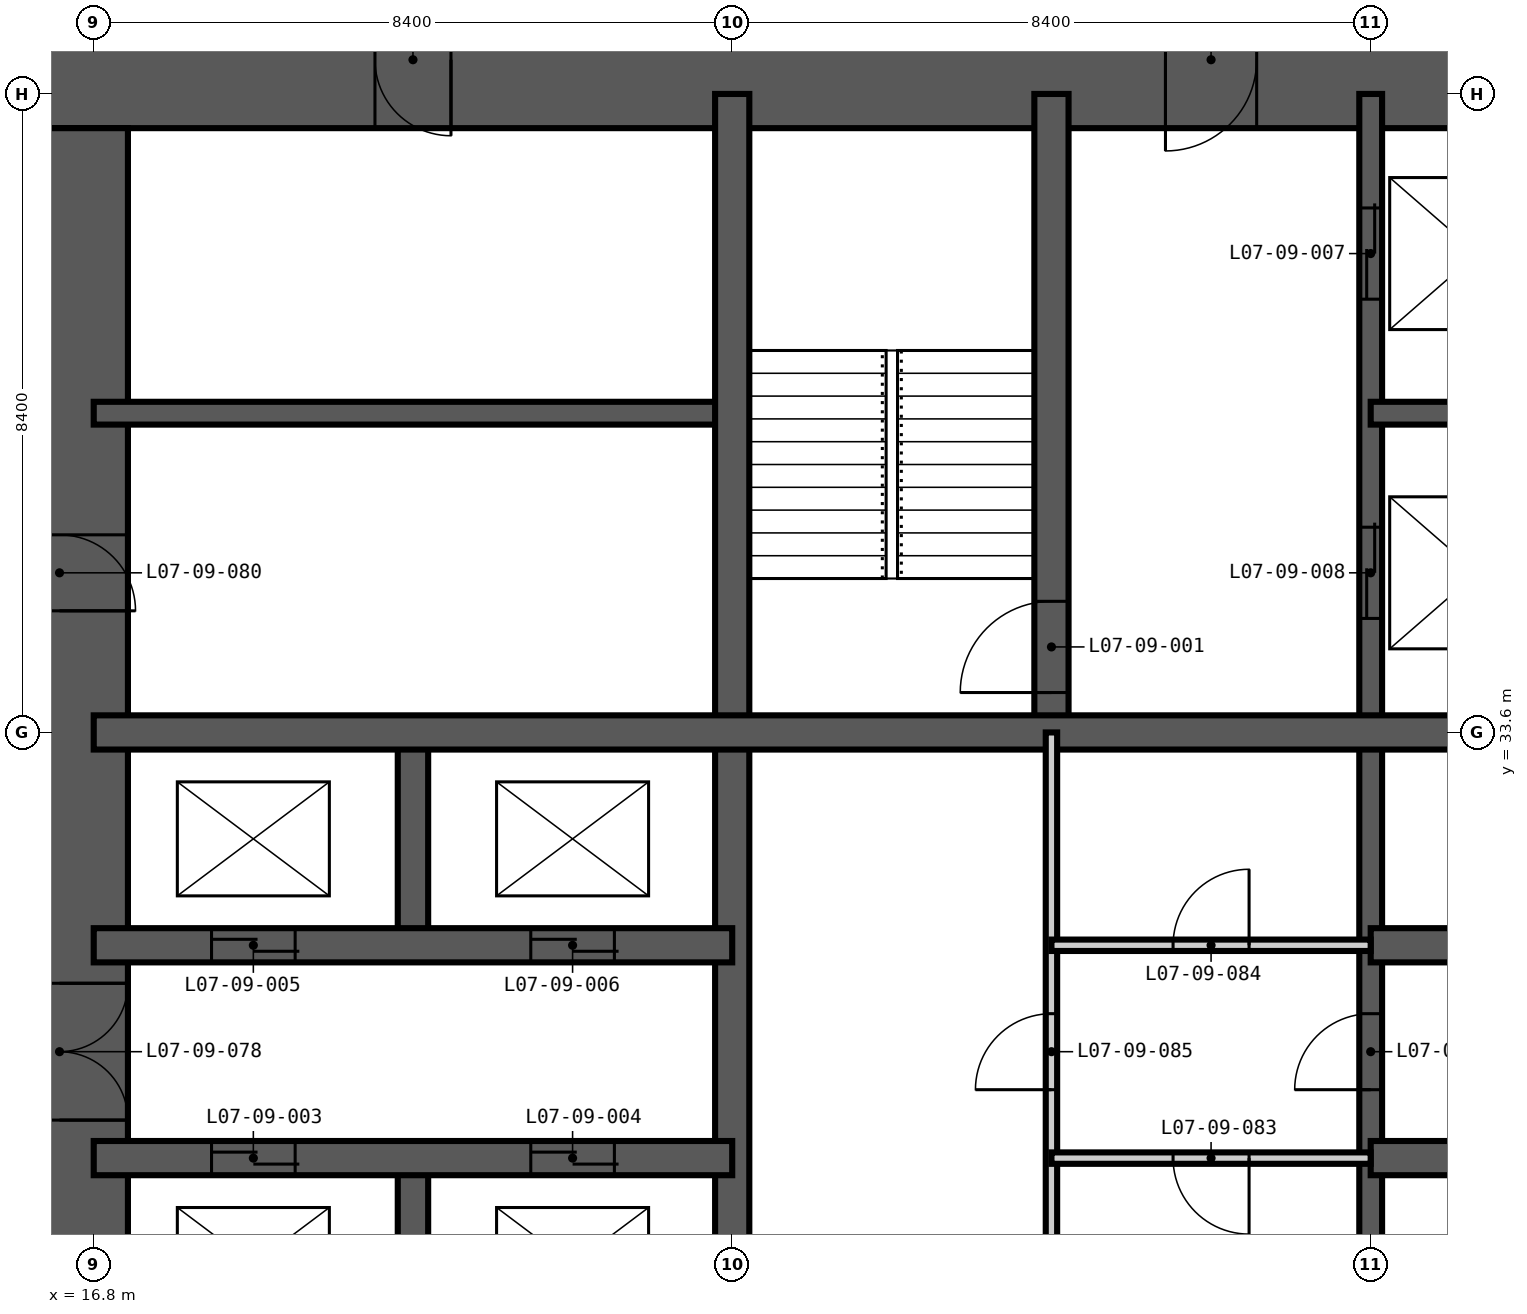
"""IFC4 building model, lengths in metres.
Left out: names, types, materials, properties, quantities, classifications, styles, units other than length and angle.
Written with IfcOpenShell. Run it as: python <this file> out.ifc"""

import sys

from ifc_helpers import new_model, si_unit, direction, frame, frame_2d, origin, place, context, subcontext, project, spatial, rectangle, extrude, element, fill, save


model = new_model("IFC4")
c1 = context("Model", 3, precision=1e-05, world=origin(), true_north=direction((0.0, 1.0)))
c2 = subcontext(c1, "Body", "Model", "MODEL_VIEW")
j1 = project(units=[si_unit("LENGTHUNIT", "METRE"), si_unit("PLANEANGLEUNIT", "RADIAN")], contexts=[c1])
p1 = place(None, origin())
s1 = spatial("IfcSite", under=j1, at=p1, CompositionType="ELEMENT")
p2 = place(p1, origin())
s2 = spatial("IfcBuilding", under=s1, at=p2, CompositionType="ELEMENT")
p3 = place(p2, frame((0.0, 0.0, 34.2)))
s3 = spatial("IfcBuildingStorey", under=s2, at=p3, CompositionType="ELEMENT", Elevation=34.2)
p4 = place(p3, frame((43.35, 42.45, -0.35), z_axis=(0.0, 0.0, 1.0), x_axis=(-1.0, 0.0, 0.0)))
e1 = element("IfcWall", 1, at=p4, inside=s3, PredefinedType="SHEAR", context=c2, shape_type="SweptSolid", body=[
    extrude(rectangle(XDim=27.9, YDim=1.8, at=frame_2d((13.95, 0.0))), origin(), (0.0, 0.0, 1.0), 3.6),
])
p5 = place(p4, frame((21.85, 0.0, 0.35)))
e2 = element("IfcOpeningElement", 2, at=p5, cuts=e1, PredefinedType="OPENING", context=c2, shape_type="SweptSolid", body=[
    extrude(rectangle(XDim=1.0, YDim=2.1, at=frame_2d((0.5, 1.05))), frame((0.0, 0.91, 0.0), z_axis=(0.0, -1.0, 0.0), x_axis=(1.0, 0.0, 0.0)), (0.0, 0.0, 1.0), 1.82),
])
p6 = place(p4, frame((11.25, 0.0, 0.35)))
e3 = element("IfcOpeningElement", 3, at=p6, cuts=e1, PredefinedType="OPENING", context=c2, shape_type="SweptSolid", body=[
    extrude(rectangle(XDim=1.2, YDim=2.2, at=frame_2d((0.6, 1.1))), frame((0.0, 0.91, 0.0), z_axis=(0.0, -1.0, 0.0), x_axis=(1.0, 0.0, 0.0)), (0.0, 0.0, 1.0), 1.82),
])
p7 = place(p3, frame((16.35, 41.55, -0.35), z_axis=(0.0, 0.0, 1.0), x_axis=(0.0, -1.0, 0.0)))
e4 = element("IfcWall", 4, at=p7, inside=s3, PredefinedType="SHEAR", context=c2, shape_type="SweptSolid", body=[
    extrude(rectangle(XDim=24.3, YDim=1.8, at=frame_2d((12.15, 0.0))), origin(), (0.0, 0.0, 1.0), 3.6),
])
p8 = place(p7, frame((11.25, 0.0, 0.35)))
e5 = element("IfcOpeningElement", 5, at=p8, cuts=e4, PredefinedType="OPENING", context=c2, shape_type="SweptSolid", body=[
    extrude(rectangle(XDim=1.8, YDim=2.2, at=frame_2d((0.9, 1.1))), frame((0.0, 0.91, 0.0), z_axis=(0.0, -1.0, 0.0), x_axis=(1.0, 0.0, 0.0)), (0.0, 0.0, 1.0), 1.82),
])
p9 = place(p7, frame((20.05, 0.0, 0.35)))
e6 = element("IfcOpeningElement", 6, at=p9, cuts=e4, PredefinedType="OPENING", context=c2, shape_type="SweptSolid", body=[
    extrude(rectangle(XDim=1.0, YDim=2.1, at=frame_2d((0.5, 1.05))), frame((0.0, 0.91, 0.0), z_axis=(0.0, -1.0, 0.0), x_axis=(1.0, 0.0, 0.0)), (0.0, 0.0, 1.0), 1.82),
])
p10 = place(p7, frame((5.35, 0.0, 0.35)))
e7 = element("IfcOpeningElement", 7, at=p10, cuts=e4, PredefinedType="OPENING", context=c2, shape_type="SweptSolid", body=[
    extrude(rectangle(XDim=1.0, YDim=2.1, at=frame_2d((0.5, 1.05))), frame((0.0, 0.91, 0.0), z_axis=(0.0, -1.0, 0.0), x_axis=(1.0, 0.0, 0.0)), (0.0, 0.0, 1.0), 1.82),
])
p11 = place(p3, frame((33.6, 16.8, -0.35), z_axis=(0.0, 0.0, 1.0), x_axis=(0.0, 1.0, 0.0)))
e8 = element("IfcWall", 8, at=p11, inside=s3, PredefinedType="SHEAR", context=c2, shape_type="SweptSolid", body=[
    extrude(rectangle(XDim=25.2, YDim=0.3, at=frame_2d((12.6, 0.0))), origin(), (0.0, 0.0, 1.0), 3.6),
])
p12 = place(p11, frame((22.5, 0.0, 0.35)))
e9 = element("IfcOpeningElement", 9, at=p12, cuts=e8, PredefinedType="OPENING", context=c2, shape_type="SweptSolid", body=[
    extrude(rectangle(XDim=1.2, YDim=2.2, at=frame_2d((0.6, 1.1))), frame((0.0, 0.16, 0.0), z_axis=(0.0, -1.0, 0.0), x_axis=(1.0, 0.0, 0.0)), (0.0, 0.0, 1.0), 0.32),
])
p13 = place(p11, frame((18.3, 0.0, 0.35)))
e10 = element("IfcOpeningElement", 10, at=p13, cuts=e8, PredefinedType="OPENING", context=c2, shape_type="SweptSolid", body=[
    extrude(rectangle(XDim=1.2, YDim=2.2, at=frame_2d((0.6, 1.1))), frame((0.0, 0.16, 0.0), z_axis=(0.0, -1.0, 0.0), x_axis=(1.0, 0.0, 0.0)), (0.0, 0.0, 1.0), 0.32),
])
p14 = place(p11, frame((12.1, 0.0, 0.35)))
e11 = element("IfcOpeningElement", 11, at=p14, cuts=e8, PredefinedType="OPENING", context=c2, shape_type="SweptSolid", body=[
    extrude(rectangle(XDim=1.0, YDim=2.1, at=frame_2d((0.5, 1.05))), frame((0.0, 0.16, 0.0), z_axis=(0.0, -1.0, 0.0), x_axis=(1.0, 0.0, 0.0)), (0.0, 0.0, 1.0), 0.32),
])
p15 = place(p3, frame((16.8, 37.8, -0.35), z_axis=(0.0, 0.0, 1.0), x_axis=(1.0, 0.0, 0.0)))
e12 = element("IfcWall", 12, at=p15, inside=s3, PredefinedType="SHEAR", context=c2, shape_type="SweptSolid", body=[
    extrude(rectangle(XDim=8.4, YDim=0.3, at=frame_2d((4.2, 0.0))), origin(), (0.0, 0.0, 1.0), 3.6),
])
p16 = place(p3, frame((33.6, 37.8, -0.35), z_axis=(0.0, 0.0, 1.0), x_axis=(1.0, 0.0, 0.0)))
e13 = element("IfcWall", 13, at=p16, inside=s3, PredefinedType="SHEAR", context=c2, shape_type="SweptSolid", body=[
    extrude(rectangle(XDim=2.8, YDim=0.3, at=frame_2d((1.4, 0.0))), origin(), (0.0, 0.0, 1.0), 3.6),
])
for number, where, z_axis, x_axis in (
    (14, (21.0, 25.2, -0.35), (0.0, 0.0, 1.0), (0.0, 1.0, 0.0)),
    (15, (21.0, 30.8, -0.35), (0.0, 0.0, 1.0), (0.0, 1.0, 0.0)),
):
    element("IfcWall", number, at=place(p3, frame(where, z_axis=z_axis, x_axis=x_axis)), inside=s3, PredefinedType="SHEAR", context=c2, shape_type="SweptSolid", body=[
        extrude(rectangle(XDim=2.8, YDim=0.4, at=frame_2d((1.4, 0.0))), origin(), (0.0, 0.0, 1.0), 3.6),
    ])
p17 = place(p3, frame((25.2, 16.8, -0.35), z_axis=(0.0, 0.0, 1.0), x_axis=(0.0, 1.0, 0.0)))
e16 = element("IfcWall", 16, at=p17, inside=s3, PredefinedType="SHEAR", context=c2, shape_type="SweptSolid", body=[
    extrude(rectangle(XDim=25.2, YDim=0.45, at=frame_2d((12.6, 0.0))), origin(), (0.0, 0.0, 1.0), 3.6),
])
p18 = place(p3, frame((29.4, 33.6, -0.35), z_axis=(0.0, 0.0, 1.0), x_axis=(0.0, 1.0, 0.0)))
e17 = element("IfcWall", 17, at=p18, inside=s3, PredefinedType="SHEAR", context=c2, shape_type="SweptSolid", body=[
    extrude(rectangle(XDim=8.4, YDim=0.45, at=frame_2d((4.2, 0.0))), origin(), (0.0, 0.0, 1.0), 3.6),
])
p19 = place(p18, frame((0.525, 0.0, 0.35)))
e18 = element("IfcOpeningElement", 18, at=p19, cuts=e17, PredefinedType="OPENING", context=c2, shape_type="SweptSolid", body=[
    extrude(rectangle(XDim=1.2, YDim=2.2, at=frame_2d((0.6, 1.1))), frame((0.0, 0.235, 0.0), z_axis=(0.0, -1.0, 0.0), x_axis=(1.0, 0.0, 0.0)), (0.0, 0.0, 1.0), 0.47),
])
p20 = place(p3, frame((16.8, 28.0, -0.35), z_axis=(0.0, 0.0, 1.0), x_axis=(1.0, 0.0, 0.0)))
e19 = element("IfcWall", 19, at=p20, inside=s3, PredefinedType="SHEAR", context=c2, shape_type="SweptSolid", body=[
    extrude(rectangle(XDim=8.4, YDim=0.45, at=frame_2d((4.2, 0.0))), origin(), (0.0, 0.0, 1.0), 3.6),
])
p21 = place(p20, frame((1.55, 0.0, 0.35)))
e20 = element("IfcOpeningElement", 20, at=p21, cuts=e19, PredefinedType="OPENING", context=c2, shape_type="SweptSolid", body=[
    extrude(rectangle(XDim=1.1, YDim=2.2, at=frame_2d((0.55, 1.1))), frame((0.0, 0.235, 0.0), z_axis=(0.0, -1.0, 0.0), x_axis=(1.0, 0.0, 0.0)), (0.0, 0.0, 1.0), 0.47),
])
p22 = place(p20, frame((5.75, 0.0, 0.35)))
e21 = element("IfcOpeningElement", 21, at=p22, cuts=e19, PredefinedType="OPENING", context=c2, shape_type="SweptSolid", body=[
    extrude(rectangle(XDim=1.1, YDim=2.2, at=frame_2d((0.55, 1.1))), frame((0.0, 0.235, 0.0), z_axis=(0.0, -1.0, 0.0), x_axis=(1.0, 0.0, 0.0)), (0.0, 0.0, 1.0), 0.47),
])
p23 = place(p3, frame((33.6, 28.0, -0.35), z_axis=(0.0, 0.0, 1.0), x_axis=(1.0, 0.0, 0.0)))
e22 = element("IfcWall", 22, at=p23, inside=s3, PredefinedType="SHEAR", context=c2, shape_type="SweptSolid", body=[
    extrude(rectangle(XDim=8.4, YDim=0.45, at=frame_2d((4.2, 0.0))), origin(), (0.0, 0.0, 1.0), 3.6),
])
p24 = place(p3, frame((16.8, 30.8, -0.35), z_axis=(0.0, 0.0, 1.0), x_axis=(1.0, 0.0, 0.0)))
e23 = element("IfcWall", 23, at=p24, inside=s3, PredefinedType="SHEAR", context=c2, shape_type="SweptSolid", body=[
    extrude(rectangle(XDim=8.4, YDim=0.45, at=frame_2d((4.2, 0.0))), origin(), (0.0, 0.0, 1.0), 3.6),
])
p25 = place(p24, frame((1.55, 0.0, 0.35)))
e24 = element("IfcOpeningElement", 24, at=p25, cuts=e23, PredefinedType="OPENING", context=c2, shape_type="SweptSolid", body=[
    extrude(rectangle(XDim=1.1, YDim=2.2, at=frame_2d((0.55, 1.1))), frame((0.0, 0.235, 0.0), z_axis=(0.0, -1.0, 0.0), x_axis=(1.0, 0.0, 0.0)), (0.0, 0.0, 1.0), 0.47),
])
p26 = place(p24, frame((5.75, 0.0, 0.35)))
e25 = element("IfcOpeningElement", 25, at=p26, cuts=e23, PredefinedType="OPENING", context=c2, shape_type="SweptSolid", body=[
    extrude(rectangle(XDim=1.1, YDim=2.2, at=frame_2d((0.55, 1.1))), frame((0.0, 0.235, 0.0), z_axis=(0.0, -1.0, 0.0), x_axis=(1.0, 0.0, 0.0)), (0.0, 0.0, 1.0), 0.47),
])
p27 = place(p3, frame((33.6, 30.8, -0.35), z_axis=(0.0, 0.0, 1.0), x_axis=(1.0, 0.0, 0.0)))
e26 = element("IfcWall", 26, at=p27, inside=s3, PredefinedType="SHEAR", context=c2, shape_type="SweptSolid", body=[
    extrude(rectangle(XDim=8.4, YDim=0.45, at=frame_2d((4.2, 0.0))), origin(), (0.0, 0.0, 1.0), 3.6),
])
p28 = place(p27, frame((1.6, 0.0, 0.35)))
e27 = element("IfcOpeningElement", 27, at=p28, cuts=e26, PredefinedType="OPENING", context=c2, shape_type="SweptSolid", body=[
    extrude(rectangle(XDim=1.0, YDim=2.1, at=frame_2d((0.5, 1.05))), frame((0.0, 0.235, 0.0), z_axis=(0.0, -1.0, 0.0), x_axis=(1.0, 0.0, 0.0)), (0.0, 0.0, 1.0), 0.47),
])
p29 = place(p27, frame((4.6, 0.0, 0.35)))
e28 = element("IfcOpeningElement", 28, at=p29, cuts=e26, PredefinedType="OPENING", context=c2, shape_type="SweptSolid", body=[
    extrude(rectangle(XDim=1.0, YDim=2.1, at=frame_2d((0.5, 1.05))), frame((0.0, 0.235, 0.0), z_axis=(0.0, -1.0, 0.0), x_axis=(1.0, 0.0, 0.0)), (0.0, 0.0, 1.0), 0.47),
])
p30 = place(p3, frame((16.8, 33.6, -0.35), z_axis=(0.0, 0.0, 1.0), x_axis=(1.0, 0.0, 0.0)))
e29 = element("IfcWall", 29, at=p30, inside=s3, PredefinedType="SHEAR", context=c2, shape_type="SweptSolid", body=[
    extrude(rectangle(XDim=25.2, YDim=0.45, at=frame_2d((12.6, 0.0))), origin(), (0.0, 0.0, 1.0), 3.6),
])
p31 = place(p3, frame((29.4, 25.2, 0.0), z_axis=(0.0, 0.0, 1.0), x_axis=(0.0, 1.0, 0.0)))
e30 = element("IfcWall", 30, at=p31, inside=s3, PredefinedType="PARTITIONING", context=c2, shape_type="SweptSolid", body=[
    extrude(rectangle(XDim=8.4, YDim=0.15, at=frame_2d((4.2, 0.0))), origin(), (0.0, 0.0, 1.0), 3.25),
])
p32 = place(p31, frame((3.7, 0.0, 0.0)))
e31 = element("IfcOpeningElement", 31, at=p32, cuts=e30, PredefinedType="OPENING", context=c2, shape_type="SweptSolid", body=[
    extrude(rectangle(XDim=1.0, YDim=2.1, at=frame_2d((0.5, 1.05))), frame((0.0, 0.085, 0.0), z_axis=(0.0, -1.0, 0.0), x_axis=(1.0, 0.0, 0.0)), (0.0, 0.0, 1.0), 0.17),
])
p33 = place(p3, frame((29.4, 28.0, 0.0), z_axis=(0.0, 0.0, 1.0), x_axis=(1.0, 0.0, 0.0)))
e32 = element("IfcWall", 32, at=p33, inside=s3, PredefinedType="PARTITIONING", context=c2, shape_type="SweptSolid", body=[
    extrude(rectangle(XDim=4.2, YDim=0.15, at=frame_2d((2.1, 0.0))), origin(), (0.0, 0.0, 1.0), 3.25),
])
p34 = place(p33, frame((1.6, 0.0, 0.0)))
e33 = element("IfcOpeningElement", 33, at=p34, cuts=e32, PredefinedType="OPENING", context=c2, shape_type="SweptSolid", body=[
    extrude(rectangle(XDim=1.0, YDim=2.1, at=frame_2d((0.5, 1.05))), frame((0.0, 0.085, 0.0), z_axis=(0.0, -1.0, 0.0), x_axis=(1.0, 0.0, 0.0)), (0.0, 0.0, 1.0), 0.17),
])
p35 = place(p3, frame((29.4, 30.8, 0.0), z_axis=(0.0, 0.0, 1.0), x_axis=(1.0, 0.0, 0.0)))
e34 = element("IfcWall", 34, at=p35, inside=s3, PredefinedType="PARTITIONING", context=c2, shape_type="SweptSolid", body=[
    extrude(rectangle(XDim=4.2, YDim=0.15, at=frame_2d((2.1, 0.0))), origin(), (0.0, 0.0, 1.0), 3.25),
])
p36 = place(p35, frame((1.6, 0.0, 0.0)))
e35 = element("IfcOpeningElement", 35, at=p36, cuts=e34, PredefinedType="OPENING", context=c2, shape_type="SweptSolid", body=[
    extrude(rectangle(XDim=1.0, YDim=2.1, at=frame_2d((0.5, 1.05))), frame((0.0, 0.085, 0.0), z_axis=(0.0, -1.0, 0.0), x_axis=(1.0, 0.0, 0.0)), (0.0, 0.0, 1.0), 0.17),
])
p37 = place(p19, origin())
e36 = element("IfcDoor", 36, at=p37, inside=s3, OperationType="SINGLE_SWING_LEFT", PredefinedType="DOOR", context=c2, shape_type="SweptSolid", body=[
    extrude(rectangle(XDim=1.2, YDim=2.2, at=frame_2d((0.6, 1.1))), frame((0.0, 0.025, 0.0), z_axis=(0.0, -1.0, 0.0), x_axis=(1.0, 0.0, 0.0)), (0.0, 0.0, 1.0), 0.05),
])
fill(e18, e36)
p38 = place(p21, origin())
e37 = element("IfcDoor", 37, at=p38, inside=s3, OperationType="DOUBLE_DOOR_SLIDING", PredefinedType="DOOR", context=c2, shape_type="SweptSolid", body=[
    extrude(rectangle(XDim=1.1, YDim=2.2, at=frame_2d((0.55, 1.1))), frame((0.0, 0.025, 0.0), z_axis=(0.0, -1.0, 0.0), x_axis=(1.0, 0.0, 0.0)), (0.0, 0.0, 1.0), 0.05),
])
fill(e20, e37)
p39 = place(p22, origin())
e38 = element("IfcDoor", 38, at=p39, inside=s3, OperationType="DOUBLE_DOOR_SLIDING", PredefinedType="DOOR", context=c2, shape_type="SweptSolid", body=[
    extrude(rectangle(XDim=1.1, YDim=2.2, at=frame_2d((0.55, 1.1))), frame((0.0, 0.025, 0.0), z_axis=(0.0, -1.0, 0.0), x_axis=(1.0, 0.0, 0.0)), (0.0, 0.0, 1.0), 0.05),
])
fill(e21, e38)
p40 = place(p25, origin())
e39 = element("IfcDoor", 39, at=p40, inside=s3, OperationType="DOUBLE_DOOR_SLIDING", PredefinedType="DOOR", context=c2, shape_type="SweptSolid", body=[
    extrude(rectangle(XDim=1.1, YDim=2.2, at=frame_2d((0.55, 1.1))), frame((0.0, 0.025, 0.0), z_axis=(0.0, -1.0, 0.0), x_axis=(1.0, 0.0, 0.0)), (0.0, 0.0, 1.0), 0.05),
])
fill(e24, e39)
p41 = place(p26, origin())
e40 = element("IfcDoor", 40, at=p41, inside=s3, OperationType="DOUBLE_DOOR_SLIDING", PredefinedType="DOOR", context=c2, shape_type="SweptSolid", body=[
    extrude(rectangle(XDim=1.1, YDim=2.2, at=frame_2d((0.55, 1.1))), frame((0.0, 0.025, 0.0), z_axis=(0.0, -1.0, 0.0), x_axis=(1.0, 0.0, 0.0)), (0.0, 0.0, 1.0), 0.05),
])
fill(e25, e40)
p42 = place(p12, origin())
e41 = element("IfcDoor", 41, at=p42, inside=s3, OperationType="DOUBLE_DOOR_SLIDING", PredefinedType="DOOR", context=c2, shape_type="SweptSolid", body=[
    extrude(rectangle(XDim=1.2, YDim=2.2, at=frame_2d((0.6, 1.1))), frame((0.0, 0.025, 0.0), z_axis=(0.0, -1.0, 0.0), x_axis=(1.0, 0.0, 0.0)), (0.0, 0.0, 1.0), 0.05),
])
fill(e9, e41)
p43 = place(p13, origin())
e42 = element("IfcDoor", 42, at=p43, inside=s3, OperationType="DOUBLE_DOOR_SLIDING", PredefinedType="DOOR", context=c2, shape_type="SweptSolid", body=[
    extrude(rectangle(XDim=1.2, YDim=2.2, at=frame_2d((0.6, 1.1))), frame((0.0, 0.025, 0.0), z_axis=(0.0, -1.0, 0.0), x_axis=(1.0, 0.0, 0.0)), (0.0, 0.0, 1.0), 0.05),
])
fill(e10, e42)
p44 = place(p8, origin())
e43 = element("IfcDoor", 43, at=p44, inside=s3, OperationType="DOUBLE_DOOR_DOUBLE_SWING", PredefinedType="DOOR", context=c2, shape_type="SweptSolid", body=[
    extrude(rectangle(XDim=1.8, YDim=2.2, at=frame_2d((0.9, 1.1))), frame((0.0, 0.025, 0.0), z_axis=(0.0, -1.0, 0.0), x_axis=(1.0, 0.0, 0.0)), (0.0, 0.0, 1.0), 0.05),
])
fill(e5, e43)
p45 = place(p10, origin())
e44 = element("IfcDoor", 44, at=p45, inside=s3, OperationType="SINGLE_SWING_RIGHT", PredefinedType="DOOR", context=c2, shape_type="SweptSolid", body=[
    extrude(rectangle(XDim=1.0, YDim=2.1, at=frame_2d((0.5, 1.05))), frame((0.0, 0.025, 0.0), z_axis=(0.0, -1.0, 0.0), x_axis=(1.0, 0.0, 0.0)), (0.0, 0.0, 1.0), 0.05),
])
fill(e7, e44)
p46 = place(p5, origin())
e45 = element("IfcDoor", 45, at=p46, inside=s3, OperationType="SINGLE_SWING_LEFT", PredefinedType="DOOR", context=c2, shape_type="SweptSolid", body=[
    extrude(rectangle(XDim=1.0, YDim=2.1, at=frame_2d((0.5, 1.05))), frame((0.0, 0.025, 0.0), z_axis=(0.0, -1.0, 0.0), x_axis=(1.0, 0.0, 0.0)), (0.0, 0.0, 1.0), 0.05),
])
fill(e2, e45)
p47 = place(p14, origin())
e46 = element("IfcDoor", 46, at=p47, inside=s3, OperationType="SINGLE_SWING_LEFT", PredefinedType="DOOR", context=c2, shape_type="SweptSolid", body=[
    extrude(rectangle(XDim=1.0, YDim=2.1, at=frame_2d((0.5, 1.05))), frame((0.0, 0.025, 0.0), z_axis=(0.0, -1.0, 0.0), x_axis=(1.0, 0.0, 0.0)), (0.0, 0.0, 1.0), 0.05),
])
fill(e11, e46)
p48 = place(p34, frame((1.0, 0.0, 0.0), z_axis=(0.0, 0.0, 1.0), x_axis=(-1.0, 0.0, 0.0)))
e47 = element("IfcDoor", 47, at=p48, inside=s3, OperationType="SINGLE_SWING_LEFT", PredefinedType="DOOR", context=c2, shape_type="SweptSolid", body=[
    extrude(rectangle(XDim=1.0, YDim=2.1, at=frame_2d((0.5, 1.05))), frame((0.0, 0.025, 0.0), z_axis=(0.0, -1.0, 0.0), x_axis=(1.0, 0.0, 0.0)), (0.0, 0.0, 1.0), 0.05),
])
fill(e33, e47)
p49 = place(p36, origin())
e48 = element("IfcDoor", 48, at=p49, inside=s3, OperationType="SINGLE_SWING_RIGHT", PredefinedType="DOOR", context=c2, shape_type="SweptSolid", body=[
    extrude(rectangle(XDim=1.0, YDim=2.1, at=frame_2d((0.5, 1.05))), frame((0.0, 0.025, 0.0), z_axis=(0.0, -1.0, 0.0), x_axis=(1.0, 0.0, 0.0)), (0.0, 0.0, 1.0), 0.05),
])
fill(e35, e48)
p50 = place(p32, origin())
e49 = element("IfcDoor", 49, at=p50, inside=s3, OperationType="SINGLE_SWING_LEFT", PredefinedType="DOOR", context=c2, shape_type="SweptSolid", body=[
    extrude(rectangle(XDim=1.0, YDim=2.1, at=frame_2d((0.5, 1.05))), frame((0.0, 0.025, 0.0), z_axis=(0.0, -1.0, 0.0), x_axis=(1.0, 0.0, 0.0)), (0.0, 0.0, 1.0), 0.05),
])
fill(e31, e49)
p51 = place(p6, origin())
e50 = element("IfcDoor", 50, at=p51, inside=s3, OperationType="SINGLE_SWING_RIGHT", PredefinedType="DOOR", context=c2, shape_type="SweptSolid", body=[
    extrude(rectangle(XDim=1.2, YDim=2.2, at=frame_2d((0.6, 1.1))), frame((0.0, 0.025, 0.0), z_axis=(0.0, -1.0, 0.0), x_axis=(1.0, 0.0, 0.0)), (0.0, 0.0, 1.0), 0.05),
])
fill(e3, e50)
save(model, sys.argv[1])
